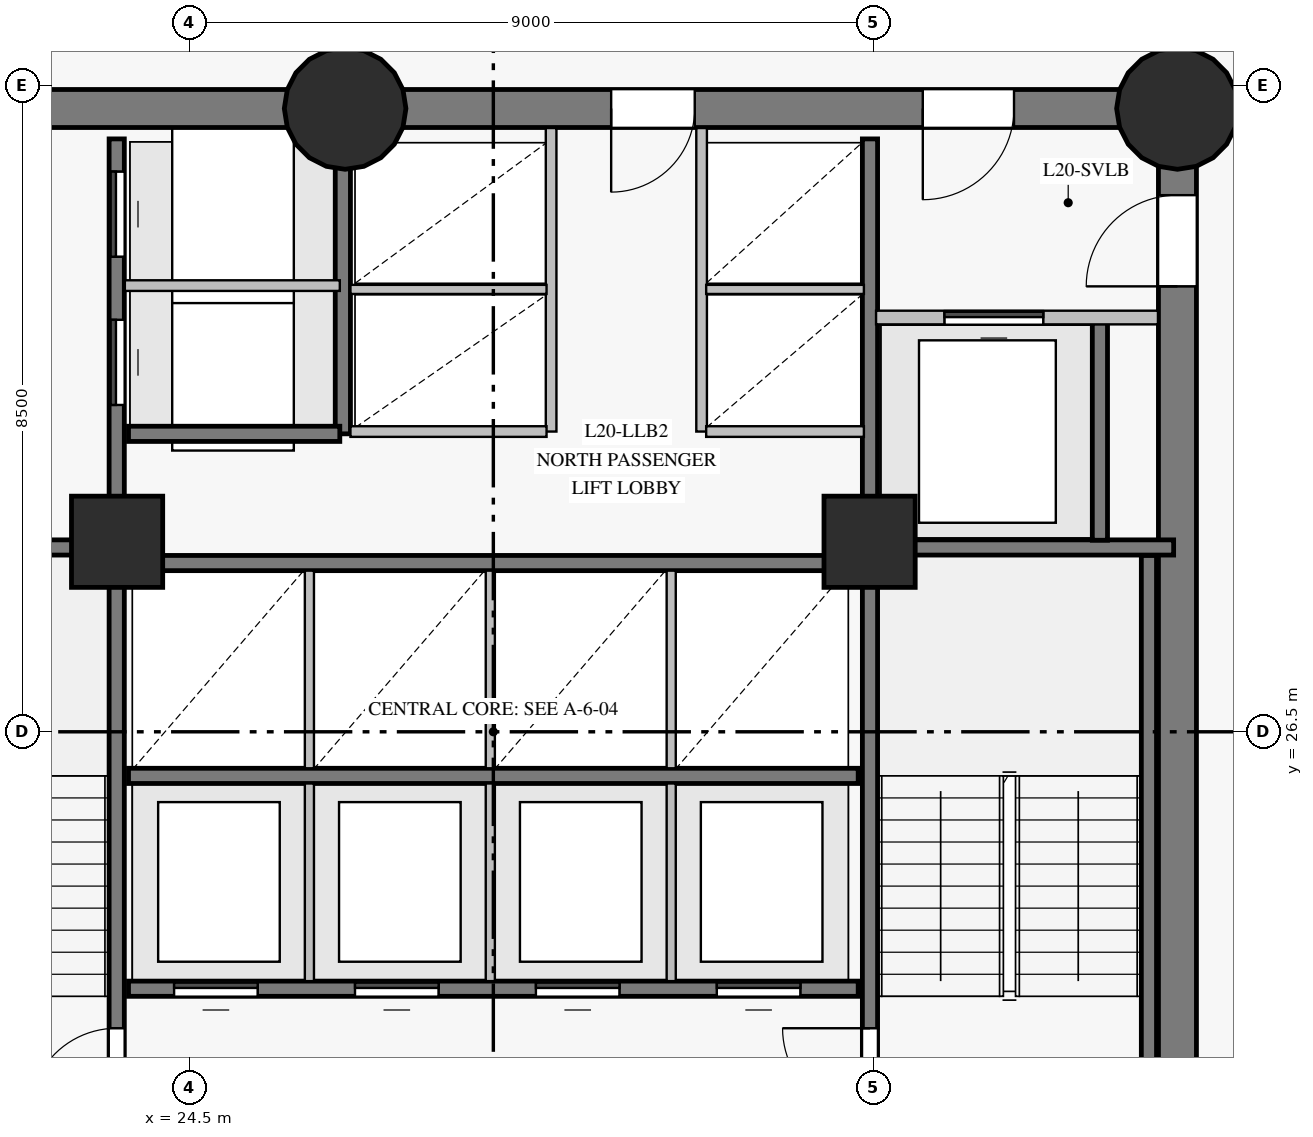
"""IFC4 building model, lengths in metres.
Left out: names, types, materials, properties, quantities, classifications, styles, units other than length and angle.
Written with IfcOpenShell. Run it as: python <this file> out.ifc"""

import sys

from ifc_helpers import new_model, si_unit, direction, frame, frame_2d, origin, origin_with_axes, origin_2d, place, context, subcontext, project, spatial, rectangle, circle, extrude, source, transform, mapped, element, fill, save


model = new_model("IFC4")
c1 = context("Model", 3, precision=1e-05, world=origin(), true_north=direction((0.0, 1.0)))
c2 = subcontext(c1, "Body", "Model", "MODEL_VIEW")
j1 = project(units=[si_unit("LENGTHUNIT", "METRE"), si_unit("PLANEANGLEUNIT", "RADIAN")], contexts=[c1])
p1 = place(None, origin())
s1 = spatial("IfcSite", under=j1, at=p1, CompositionType="ELEMENT")
p2 = place(p1, origin())
s2 = spatial("IfcBuilding", under=s1, at=p2, CompositionType="ELEMENT")
p3 = place(p2, frame((0.0, 0.0, 76.9)))
s3 = spatial("IfcBuildingStorey", under=s2, at=p3, CompositionType="ELEMENT", Elevation=76.9)
p4 = place(p3, frame((37.5, 18.3, 0.0), z_axis=(0.0, 0.0, 1.0), x_axis=(0.0, 1.0, 0.0)))
e1 = element("IfcWall", 1, at=p4, inside=s3, PredefinedType="SHEAR", context=c2, shape_type="SweptSolid", body=[
    extrude(rectangle(XDim=16.4, YDim=0.5, at=frame_2d((8.2, 0.0))), origin(), (0.0, 0.0, 1.0), 3.35),
])
p5 = place(p4, frame((14.06, 0.0, 0.0)))
e2 = element("IfcOpeningElement", 2, at=p5, cuts=e1, PredefinedType="OPENING", context=c2, shape_type="SweptSolid", body=[
    extrude(rectangle(XDim=1.2, YDim=2.15, at=frame_2d((0.6, 1.075))), frame((0.0, 0.26, 0.0), z_axis=(0.0, -1.0, 0.0), x_axis=(1.0, 0.0, 0.0)), (0.0, 0.0, 1.0), 0.52),
])
p6 = place(p3, frame((37.5, 34.7, 0.0), z_axis=(0.0, 0.0, 1.0), x_axis=(-1.0, 0.0, 0.0)))
e3 = element("IfcWall", 3, at=p6, inside=s3, PredefinedType="SHEAR", context=c2, shape_type="SweptSolid", body=[
    extrude(rectangle(XDim=10.95, YDim=0.5, at=frame_2d((5.475, 0.0))), origin(), (0.0, 0.0, 1.0), 3.35),
])
p7 = place(p6, frame((2.15, 0.0, 0.0)))
e4 = element("IfcOpeningElement", 4, at=p7, cuts=e3, PredefinedType="OPENING", context=c2, shape_type="SweptSolid", body=[
    extrude(rectangle(XDim=1.2, YDim=2.15, at=frame_2d((0.6, 1.075))), frame((0.0, 0.26, 0.0), z_axis=(0.0, -1.0, 0.0), x_axis=(1.0, 0.0, 0.0)), (0.0, 0.0, 1.0), 0.52),
])
p8 = place(p6, frame((6.35, 0.0, 0.0)))
e5 = element("IfcOpeningElement", 5, at=p8, cuts=e3, PredefinedType="OPENING", context=c2, shape_type="SweptSolid", body=[
    extrude(rectangle(XDim=1.1, YDim=2.15, at=frame_2d((0.55, 1.075))), frame((0.0, 0.26, 0.0), z_axis=(0.0, -1.0, 0.0), x_axis=(1.0, 0.0, 0.0)), (0.0, 0.0, 1.0), 0.52),
])
p9 = place(p3, frame((26.55, 34.7, 0.0), z_axis=(0.0, 0.0, 1.0), x_axis=(-1.0, 0.0, 0.0)))
e6 = element("IfcWall", 6, at=p9, inside=s3, PredefinedType="SHEAR", context=c2, shape_type="SweptSolid", body=[
    extrude(rectangle(XDim=7.05, YDim=0.5, at=frame_2d((3.525, 0.0))), origin(), (0.0, 0.0, 1.0), 3.35),
])
p10 = place(p9, frame((4.25, 0.0, 0.0)))
e7 = element("IfcOpeningElement", 7, at=p10, cuts=e6, PredefinedType="OPENING", context=c2, shape_type="SweptSolid", body=[
    extrude(rectangle(XDim=1.1, YDim=2.15, at=frame_2d((0.55, 1.075))), frame((0.0, 0.26, 0.0), z_axis=(0.0, -1.0, 0.0), x_axis=(1.0, 0.0, 0.0)), (0.0, 0.0, 1.0), 0.52),
])
m1 = source(origin_with_axes(), c2, "Body", "SweptSolid", [
    extrude(circle(Radius=0.8, at=origin_2d()), origin(), (0.0, 0.0, 1.0), 3.6),
])
for number, where, z_axis, x_axis in (
    (8, (26.55, 34.7, 0.0), (0.0, 0.0, 1.0), (1.0, 0.0, 0.0)),
    (9, (37.5, 34.7, 0.0), (0.0, 0.0, 1.0), (1.0, 0.0, 0.0)),
):
    element("IfcColumn", number, at=place(p3, frame(where, z_axis=z_axis, x_axis=x_axis)), inside=s3, PredefinedType="COLUMN", context=c2, shape_type="MappedRepresentation", body=[
        mapped(m1, transform((0.0, 0.0, 0.0), scale=1.0)),
    ])
m2 = source(origin_with_axes(), c2, "Body", "SweptSolid", [
    extrude(rectangle(XDim=1.2, YDim=1.2, at=origin_2d()), origin(), (0.0, 0.0, 1.0), 3.6),
])
for number, where, z_axis, x_axis in (
    (10, (23.55, 29.0, 0.0), (0.0, 0.0, 1.0), (1.0, 0.0, 0.0)),
    (11, (33.45, 29.0, 0.0), (0.0, 0.0, 1.0), (1.0, 0.0, 0.0)),
):
    element("IfcColumn", number, at=place(p3, frame(where, z_axis=z_axis, x_axis=x_axis)), inside=s3, PredefinedType="COLUMN", context=c2, shape_type="MappedRepresentation", body=[
        mapped(m2, transform((0.0, 0.0, 0.0), scale=1.0)),
    ])
p11 = place(p3, frame((23.545, 18.7, 0.0), z_axis=(0.0, 0.0, 1.0), x_axis=(0.0, 1.0, 0.0)))
e12 = element("IfcWall", 12, at=p11, inside=s3, PredefinedType="SHEAR", context=c2, shape_type="SweptSolid", body=[
    extrude(rectangle(XDim=15.6, YDim=0.2, at=frame_2d((7.8, 0.0))), origin(), (0.0, 0.0, 1.0), 3.35),
])
p12 = place(p11, frame((2.75, 0.0, 0.0)))
e13 = element("IfcOpeningElement", 13, at=p12, cuts=e12, PredefinedType="OPENING", context=c2, shape_type="SweptSolid", body=[
    extrude(rectangle(XDim=1.15, YDim=2.15, at=frame_2d((0.575, 1.075))), frame((0.0, 0.11, 0.0), z_axis=(0.0, -1.0, 0.0), x_axis=(1.0, 0.0, 0.0)), (0.0, 0.0, 1.0), 0.22),
])
p13 = place(p11, frame((0.14, 0.0, 0.0)))
e14 = element("IfcOpeningElement", 14, at=p13, cuts=e12, PredefinedType="OPENING", context=c2, shape_type="SweptSolid", body=[
    extrude(rectangle(XDim=0.88, YDim=2.1, at=frame_2d((0.44, 1.05))), frame((0.0, 0.11, 0.0), z_axis=(0.0, -1.0, 0.0), x_axis=(1.0, 0.0, 0.0)), (0.0, 0.0, 1.0), 0.22),
])
p14 = place(p11, frame((1.36, 0.0, 0.0)))
e15 = element("IfcOpeningElement", 15, at=p14, cuts=e12, PredefinedType="OPENING", context=c2, shape_type="SweptSolid", body=[
    extrude(rectangle(XDim=0.88, YDim=2.1, at=frame_2d((0.44, 1.05))), frame((0.0, 0.11, 0.0), z_axis=(0.0, -1.0, 0.0), x_axis=(1.0, 0.0, 0.0)), (0.0, 0.0, 1.0), 0.22),
])
p15 = place(p11, frame((12.1, 0.0, 0.0)))
e16 = element("IfcOpeningElement", 16, at=p15, cuts=e12, PredefinedType="OPENING", context=c2, shape_type="SweptSolid", body=[
    extrude(rectangle(XDim=1.12, YDim=2.15, at=frame_2d((0.56, 1.075))), frame((0.0, 0.11, 0.0), z_axis=(0.0, -1.0, 0.0), x_axis=(1.0, 0.0, 0.0)), (0.0, 0.0, 1.0), 0.22),
])
p16 = place(p11, frame((14.05, 0.0, 0.0)))
e17 = element("IfcOpeningElement", 17, at=p16, cuts=e12, PredefinedType="OPENING", context=c2, shape_type="SweptSolid", body=[
    extrude(rectangle(XDim=1.12, YDim=2.15, at=frame_2d((0.56, 1.075))), frame((0.0, 0.11, 0.0), z_axis=(0.0, -1.0, 0.0), x_axis=(1.0, 0.0, 0.0)), (0.0, 0.0, 1.0), 0.22),
])
p17 = place(p3, frame((33.455, 18.7, 0.0), z_axis=(0.0, 0.0, 1.0), x_axis=(0.0, 1.0, 0.0)))
e18 = element("IfcWall", 18, at=p17, inside=s3, PredefinedType="SHEAR", context=c2, shape_type="SweptSolid", body=[
    extrude(rectangle(XDim=15.6, YDim=0.2, at=frame_2d((7.8, 0.0))), origin(), (0.0, 0.0, 1.0), 3.35),
])
p18 = place(p17, frame((2.75, 0.0, 0.0)))
e19 = element("IfcOpeningElement", 19, at=p18, cuts=e18, PredefinedType="OPENING", context=c2, shape_type="SweptSolid", body=[
    extrude(rectangle(XDim=1.15, YDim=2.15, at=frame_2d((0.575, 1.075))), frame((0.0, 0.11, 0.0), z_axis=(0.0, -1.0, 0.0), x_axis=(1.0, 0.0, 0.0)), (0.0, 0.0, 1.0), 0.22),
])
p19 = place(p17, frame((0.55, 0.0, 0.0)))
e20 = element("IfcOpeningElement", 20, at=p19, cuts=e18, PredefinedType="OPENING", context=c2, shape_type="SweptSolid", body=[
    extrude(rectangle(XDim=0.94, YDim=2.1, at=frame_2d((0.47, 1.05))), frame((0.0, 0.11, 0.0), z_axis=(0.0, -1.0, 0.0), x_axis=(1.0, 0.0, 0.0)), (0.0, 0.0, 1.0), 0.22),
])
p20 = place(p3, frame((23.7, 23.12, 0.0), z_axis=(0.0, 0.0, 1.0), x_axis=(1.0, 0.0, 0.0)))
e21 = element("IfcWall", 21, at=p20, inside=s3, PredefinedType="SHEAR", context=c2, shape_type="SweptSolid", body=[
    extrude(rectangle(XDim=9.6, YDim=0.2, at=frame_2d((4.8, 0.0))), origin(), (0.0, 0.0, 1.0), 3.35),
])
p21 = place(p20, frame((0.6, 0.0, 0.0)))
e22 = element("IfcOpeningElement", 22, at=p21, cuts=e21, PredefinedType="OPENING", context=c2, shape_type="SweptSolid", body=[
    extrude(rectangle(XDim=1.1, YDim=2.15, at=frame_2d((0.55, 1.075))), frame((0.0, 0.11, 0.0), z_axis=(0.0, -1.0, 0.0), x_axis=(1.0, 0.0, 0.0)), (0.0, 0.0, 1.0), 0.22),
])
p22 = place(p20, frame((2.98, 0.0, 0.0)))
e23 = element("IfcOpeningElement", 23, at=p22, cuts=e21, PredefinedType="OPENING", context=c2, shape_type="SweptSolid", body=[
    extrude(rectangle(XDim=1.1, YDim=2.15, at=frame_2d((0.55, 1.075))), frame((0.0, 0.11, 0.0), z_axis=(0.0, -1.0, 0.0), x_axis=(1.0, 0.0, 0.0)), (0.0, 0.0, 1.0), 0.22),
])
p23 = place(p20, frame((5.36, 0.0, 0.0)))
e24 = element("IfcOpeningElement", 24, at=p23, cuts=e21, PredefinedType="OPENING", context=c2, shape_type="SweptSolid", body=[
    extrude(rectangle(XDim=1.1, YDim=2.15, at=frame_2d((0.55, 1.075))), frame((0.0, 0.11, 0.0), z_axis=(0.0, -1.0, 0.0), x_axis=(1.0, 0.0, 0.0)), (0.0, 0.0, 1.0), 0.22),
])
p24 = place(p20, frame((7.74, 0.0, 0.0)))
e25 = element("IfcOpeningElement", 25, at=p24, cuts=e21, PredefinedType="OPENING", context=c2, shape_type="SweptSolid", body=[
    extrude(rectangle(XDim=1.1, YDim=2.15, at=frame_2d((0.55, 1.075))), frame((0.0, 0.11, 0.0), z_axis=(0.0, -1.0, 0.0), x_axis=(1.0, 0.0, 0.0)), (0.0, 0.0, 1.0), 0.22),
])
for number, where, z_axis, x_axis in (
    (26, (23.7, 25.92, 0.0), (0.0, 0.0, 1.0), (1.0, 0.0, 0.0)),
    (27, (23.7, 28.72, 0.0), (0.0, 0.0, 1.0), (1.0, 0.0, 0.0)),
):
    element("IfcWall", number, at=place(p3, frame(where, z_axis=z_axis, x_axis=x_axis)), inside=s3, PredefinedType="SHEAR", context=c2, shape_type="SweptSolid", body=[
        extrude(rectangle(XDim=9.6, YDim=0.2, at=frame_2d((4.8, 0.0))), origin(), (0.0, 0.0, 1.0), 3.35),
    ])
p25 = place(p3, frame((37.125, 21.32, 0.0), z_axis=(0.0, 0.0, 1.0), x_axis=(0.0, 1.0, 0.0)))
e28 = element("IfcWall", 28, at=p25, inside=s3, PredefinedType="SHEAR", context=c2, shape_type="SweptSolid", body=[
    extrude(rectangle(XDim=7.5, YDim=0.2, at=frame_2d((3.75, 0.0))), origin(), (0.0, 0.0, 1.0), 3.35),
])
for number, where, z_axis, x_axis in (
    (29, (33.455, 28.925, 0.0), (0.0, 0.0, 1.0), (1.0, 0.0, 0.0)),
    (30, (19.55, 28.925, 0.0), (0.0, 0.0, 1.0), (1.0, 0.0, 0.0)),
):
    element("IfcWall", number, at=place(p3, frame(where, z_axis=z_axis, x_axis=x_axis)), inside=s3, PredefinedType="SHEAR", context=c2, shape_type="SweptSolid", body=[
        extrude(rectangle(XDim=3.995, YDim=0.2, at=frame_2d((1.998, 0.0))), origin(), (0.0, 0.0, 1.0), 3.35),
    ])
p26 = place(p3, frame((26.52, 30.42, 0.0), z_axis=(0.0, 0.0, 1.0), x_axis=(0.0, 1.0, 0.0)))
e31 = element("IfcWall", 31, at=p26, inside=s3, PredefinedType="SHEAR", context=c2, shape_type="SweptSolid", body=[
    extrude(rectangle(XDim=3.86, YDim=0.2, at=frame_2d((1.93, 0.0))), origin(), (0.0, 0.0, 1.0), 3.35),
])
p27 = place(p3, frame((36.48, 29.02, 0.0), z_axis=(0.0, 0.0, 1.0), x_axis=(0.0, 1.0, 0.0)))
e32 = element("IfcWall", 32, at=p27, inside=s3, PredefinedType="SHEAR", context=c2, shape_type="SweptSolid", body=[
    extrude(rectangle(XDim=2.86, YDim=0.2, at=frame_2d((1.43, 0.0))), origin(), (0.0, 0.0, 1.0), 3.35),
])
p28 = place(p3, frame((23.7, 30.42, 0.0), z_axis=(0.0, 0.0, 1.0), x_axis=(1.0, 0.0, 0.0)))
e33 = element("IfcWall", 33, at=p28, inside=s3, PredefinedType="SHEAR", context=c2, shape_type="SweptSolid", body=[
    extrude(rectangle(XDim=2.78, YDim=0.2, at=frame_2d((1.39, 0.0))), origin(), (0.0, 0.0, 1.0), 3.35),
])
for number, where, z_axis, x_axis in (
    (34, (29.26, 30.45, 0.0), (0.0, 0.0, 1.0), (0.0, 1.0, 0.0)),
    (35, (31.24, 30.45, 0.0), (0.0, 0.0, 1.0), (0.0, 1.0, 0.0)),
):
    element("IfcWall", number, at=place(p3, frame(where, z_axis=z_axis, x_axis=x_axis)), inside=s3, PredefinedType="PARTITIONING", context=c2, shape_type="SweptSolid", body=[
        extrude(rectangle(XDim=3.993, YDim=0.14, at=frame_2d((1.997, 0.0))), origin(), (0.0, 0.0, 1.0), 3.35),
    ])
p29 = place(p3, frame((33.535, 31.95, 0.0), z_axis=(0.0, 0.0, 1.0), x_axis=(1.0, 0.0, 0.0)))
e36 = element("IfcWall", 36, at=p29, inside=s3, PredefinedType="PARTITIONING", context=c2, shape_type="SweptSolid", body=[
    extrude(rectangle(XDim=3.709, YDim=0.18, at=frame_2d((1.854, 0.0))), origin(), (0.0, 0.0, 1.0), 3.35),
])
p30 = place(p29, frame((0.9, 0.0, 0.0)))
e37 = element("IfcOpeningElement", 37, at=p30, cuts=e36, PredefinedType="OPENING", context=c2, shape_type="SweptSolid", body=[
    extrude(rectangle(XDim=1.3, YDim=2.2, at=frame_2d((0.65, 1.1))), frame((0.0, 0.1, 0.0), z_axis=(0.0, -1.0, 0.0), x_axis=(1.0, 0.0, 0.0)), (0.0, 0.0, 1.0), 0.2),
])
p31 = place(p3, frame((23.652, 32.37, 0.0), z_axis=(0.0, 0.0, 1.0), x_axis=(1.0, 0.0, 0.0)))
e38 = element("IfcWall", 38, at=p31, inside=s3, PredefinedType="PARTITIONING", context=c2, shape_type="SweptSolid", body=[
    extrude(rectangle(XDim=2.828, YDim=0.14, at=frame_2d((1.414, 0.0))), origin(), (0.0, 0.0, 1.0), 3.35),
])
for number, where, z_axis, x_axis in (
    (39, (26.08, 23.22, 0.0), (0.0, 0.0, 1.0), (0.0, 1.0, 0.0)),
    (40, (28.46, 23.22, 0.0), (0.0, 0.0, 1.0), (0.0, 1.0, 0.0)),
    (41, (30.84, 23.22, 0.0), (0.0, 0.0, 1.0), (0.0, 1.0, 0.0)),
    (42, (26.08, 26.02, 0.0), (0.0, 0.0, 1.0), (0.0, 1.0, 0.0)),
    (43, (28.46, 26.02, 0.0), (0.0, 0.0, 1.0), (0.0, 1.0, 0.0)),
    (44, (30.84, 26.02, 0.0), (0.0, 0.0, 1.0), (0.0, 1.0, 0.0)),
):
    element("IfcWall", number, at=place(p3, frame(where, z_axis=z_axis, x_axis=x_axis)), inside=s3, PredefinedType="PARTITIONING", context=c2, shape_type="SweptSolid", body=[
        extrude(rectangle(XDim=2.6, YDim=0.12, at=frame_2d((1.3, 0.0))), origin(), (0.0, 0.0, 1.0), 3.35),
    ])
p32 = place(p3, frame((26.62, 30.45, 0.0), z_axis=(0.0, 0.0, 1.0), x_axis=(1.0, 0.0, 0.0)))
e45 = element("IfcWall", 45, at=p32, inside=s3, PredefinedType="PARTITIONING", context=c2, shape_type="SweptSolid", body=[
    extrude(rectangle(XDim=2.58, YDim=0.14, at=frame_2d((1.29, 0.0))), origin(), (0.0, 0.0, 1.0), 3.35),
])
p33 = place(p3, frame((26.62, 32.32, 0.0), z_axis=(0.0, 0.0, 1.0), x_axis=(1.0, 0.0, 0.0)))
e46 = element("IfcWall", 46, at=p33, inside=s3, PredefinedType="PARTITIONING", context=c2, shape_type="SweptSolid", body=[
    extrude(rectangle(XDim=2.58, YDim=0.12, at=frame_2d((1.29, 0.0))), origin(), (0.0, 0.0, 1.0), 3.35),
])
p34 = place(p3, frame((31.3, 30.45, 0.0), z_axis=(0.0, 0.0, 1.0), x_axis=(1.0, 0.0, 0.0)))
e47 = element("IfcWall", 47, at=p34, inside=s3, PredefinedType="PARTITIONING", context=c2, shape_type="SweptSolid", body=[
    extrude(rectangle(XDim=2.075, YDim=0.14, at=frame_2d((1.038, 0.0))), origin(), (0.0, 0.0, 1.0), 3.35),
])
p35 = place(p3, frame((31.3, 32.32, 0.0), z_axis=(0.0, 0.0, 1.0), x_axis=(1.0, 0.0, 0.0)))
e48 = element("IfcWall", 48, at=p35, inside=s3, PredefinedType="PARTITIONING", context=c2, shape_type="SweptSolid", body=[
    extrude(rectangle(XDim=2.075, YDim=0.12, at=frame_2d((1.038, 0.0))), origin(), (0.0, 0.0, 1.0), 3.35),
])
m3 = source(origin_with_axes(), c2, "Body", "SweptSolid", [
    extrude(rectangle(XDim=1.15, YDim=2.15, at=frame_2d((0.575, 1.075))), frame((0.0, 0.025, 0.0), z_axis=(0.0, -1.0, 0.0), x_axis=(1.0, 0.0, 0.0)), (0.0, 0.0, 1.0), 0.05),
])
p36 = place(p12, origin())
e49 = element("IfcDoor", 49, at=p36, inside=s3, OperationType="SINGLE_SWING_LEFT", PredefinedType="DOOR", context=c2, shape_type="MappedRepresentation", body=[
    mapped(m3, transform((0.0, 0.0, 0.0), scale=1.0)),
])
fill(e13, e49)
p37 = place(p18, origin())
e50 = element("IfcDoor", 50, at=p37, inside=s3, OperationType="SINGLE_SWING_RIGHT", PredefinedType="DOOR", context=c2, shape_type="MappedRepresentation", body=[
    mapped(m3, transform((0.0, 0.0, 0.0), scale=1.0)),
])
fill(e19, e50)
m4 = source(origin_with_axes(), c2, "Body", "SweptSolid", [
    extrude(rectangle(XDim=1.2, YDim=2.15, at=frame_2d((0.6, 1.075))), frame((0.0, 0.025, 0.0), z_axis=(0.0, -1.0, 0.0), x_axis=(1.0, 0.0, 0.0)), (0.0, 0.0, 1.0), 0.05),
])
p38 = place(p5, origin())
e51 = element("IfcDoor", 51, at=p38, inside=s3, OperationType="SINGLE_SWING_LEFT", PredefinedType="DOOR", context=c2, shape_type="MappedRepresentation", body=[
    mapped(m4, transform((0.0, 0.0, 0.0), scale=1.0)),
])
fill(e2, e51)
p39 = place(p7, origin())
e52 = element("IfcDoor", 52, at=p39, inside=s3, OperationType="SINGLE_SWING_RIGHT", PredefinedType="DOOR", context=c2, shape_type="MappedRepresentation", body=[
    mapped(m4, transform((0.0, 0.0, 0.0), scale=1.0)),
])
fill(e4, e52)
m5 = source(origin_with_axes(), c2, "Body", "SweptSolid", [
    extrude(rectangle(XDim=1.3, YDim=2.2, at=frame_2d((0.65, 1.1))), frame((0.0, 0.025, 0.0), z_axis=(0.0, -1.0, 0.0), x_axis=(1.0, 0.0, 0.0)), (0.0, 0.0, 1.0), 0.05),
])
p40 = place(p30, origin())
e53 = element("IfcDoor", 53, at=p40, inside=s3, OperationType="SLIDING_TO_LEFT", PredefinedType="DOOR", context=c2, shape_type="MappedRepresentation", body=[
    mapped(m5, transform((0.0, 0.0, 0.0), scale=1.0)),
])
fill(e37, e53)
m6 = source(origin_with_axes(), c2, "Body", "SweptSolid", [
    extrude(rectangle(XDim=1.1, YDim=2.15, at=frame_2d((0.55, 1.075))), frame((0.0, 0.025, 0.0), z_axis=(0.0, -1.0, 0.0), x_axis=(1.0, 0.0, 0.0)), (0.0, 0.0, 1.0), 0.05),
])
p41 = place(p21, origin())
e54 = element("IfcDoor", 54, at=p41, inside=s3, OperationType="SLIDING_TO_LEFT", PredefinedType="DOOR", context=c2, shape_type="MappedRepresentation", body=[
    mapped(m6, transform((0.0, 0.0, 0.0), scale=1.0)),
])
fill(e22, e54)
p42 = place(p22, origin())
e55 = element("IfcDoor", 55, at=p42, inside=s3, OperationType="SLIDING_TO_RIGHT", PredefinedType="DOOR", context=c2, shape_type="MappedRepresentation", body=[
    mapped(m6, transform((0.0, 0.0, 0.0), scale=1.0)),
])
fill(e23, e55)
p43 = place(p23, origin())
e56 = element("IfcDoor", 56, at=p43, inside=s3, OperationType="SLIDING_TO_LEFT", PredefinedType="DOOR", context=c2, shape_type="MappedRepresentation", body=[
    mapped(m6, transform((0.0, 0.0, 0.0), scale=1.0)),
])
fill(e24, e56)
p44 = place(p24, origin())
e57 = element("IfcDoor", 57, at=p44, inside=s3, OperationType="SLIDING_TO_RIGHT", PredefinedType="DOOR", context=c2, shape_type="MappedRepresentation", body=[
    mapped(m6, transform((0.0, 0.0, 0.0), scale=1.0)),
])
fill(e25, e57)
p45 = place(p8, origin())
e58 = element("IfcDoor", 58, at=p45, inside=s3, OperationType="SINGLE_SWING_RIGHT", PredefinedType="DOOR", context=c2, shape_type="MappedRepresentation", body=[
    mapped(m6, transform((0.0, 0.0, 0.0), scale=1.0)),
])
fill(e5, e58)
m7 = source(origin_with_axes(), c2, "Body", "SweptSolid", [
    extrude(rectangle(XDim=1.12, YDim=2.15, at=frame_2d((0.56, 1.075))), frame((0.0, 0.025, 0.0), z_axis=(0.0, -1.0, 0.0), x_axis=(1.0, 0.0, 0.0)), (0.0, 0.0, 1.0), 0.05),
])
p46 = place(p15, origin())
e59 = element("IfcDoor", 59, at=p46, inside=s3, OperationType="SLIDING_TO_LEFT", PredefinedType="DOOR", context=c2, shape_type="MappedRepresentation", body=[
    mapped(m7, transform((0.0, 0.0, 0.0), scale=1.0)),
])
fill(e16, e59)
p47 = place(p16, origin())
e60 = element("IfcDoor", 60, at=p47, inside=s3, OperationType="SLIDING_TO_RIGHT", PredefinedType="DOOR", context=c2, shape_type="MappedRepresentation", body=[
    mapped(m7, transform((0.0, 0.0, 0.0), scale=1.0)),
])
fill(e17, e60)
save(model, sys.argv[1])
